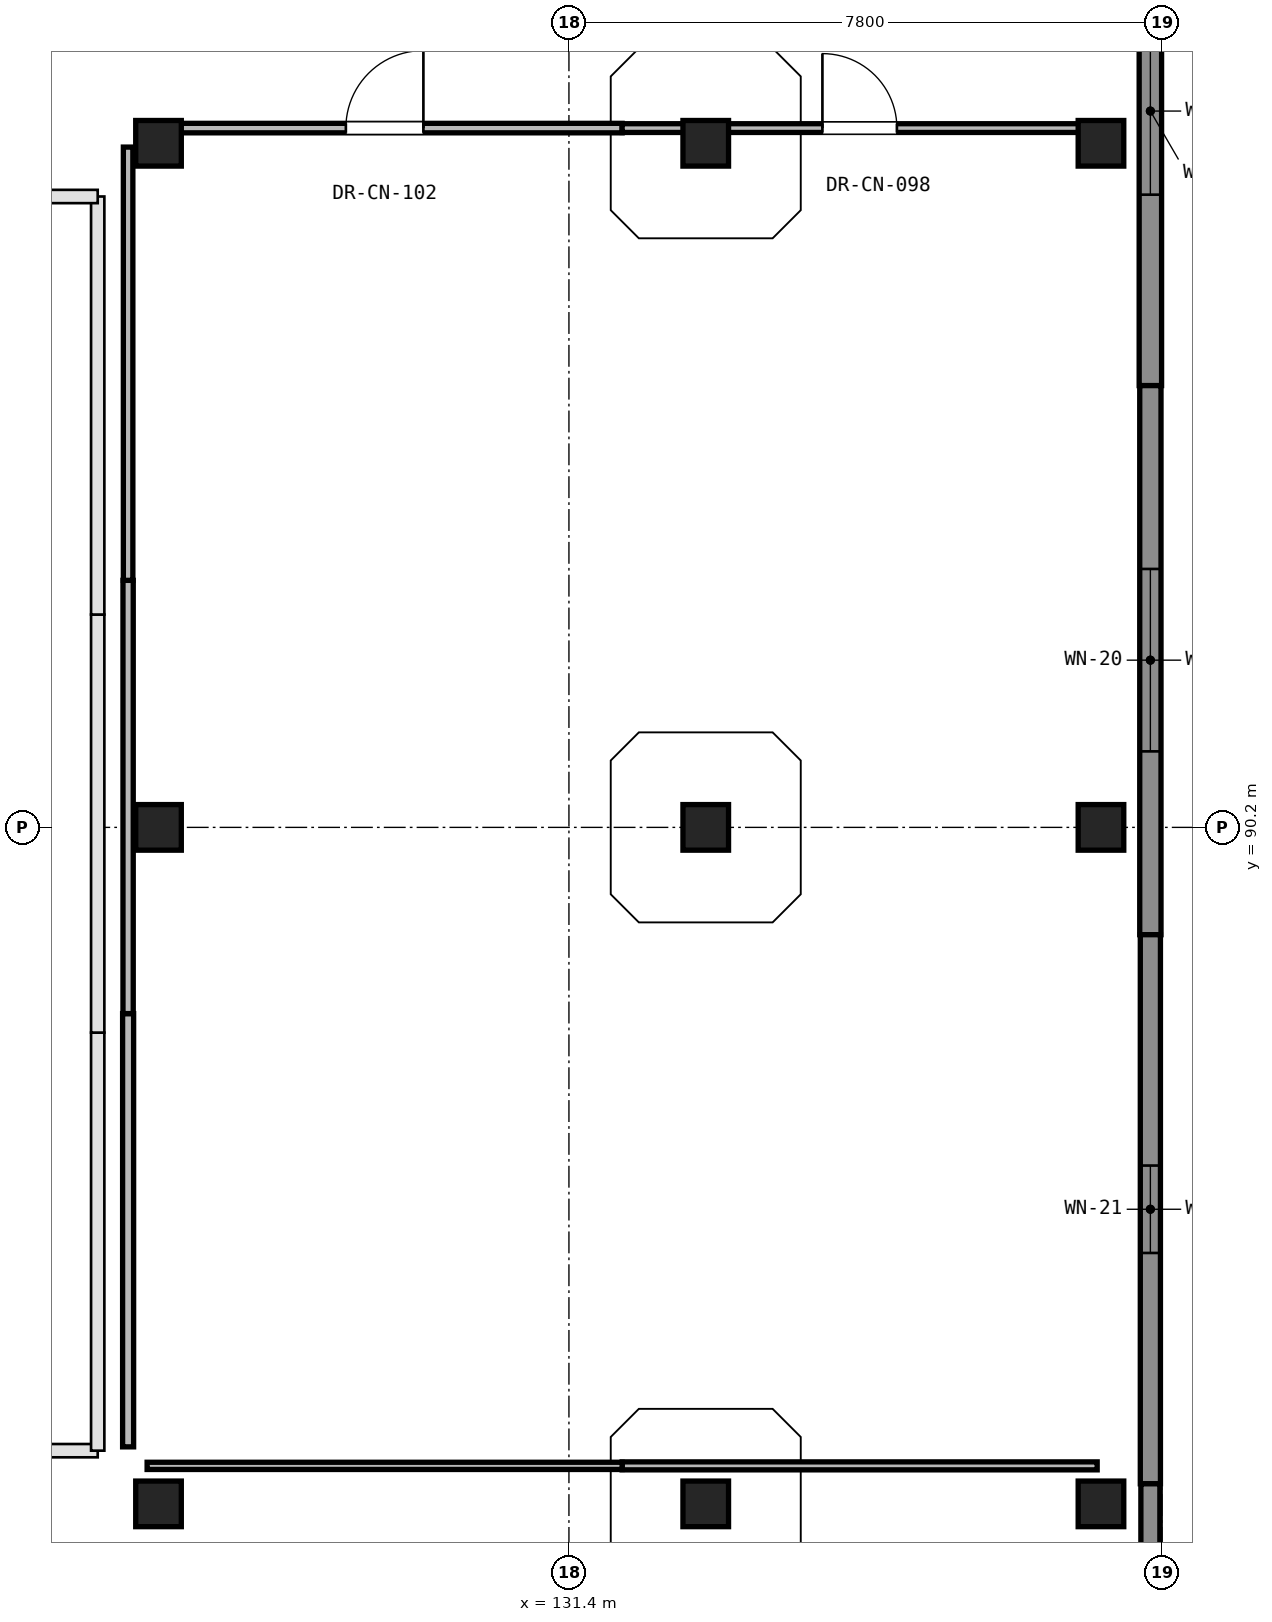
"""IFC4 building model, lengths in metres.
Left out: names, types, materials, properties, quantities, classifications, styles, units other than length and angle.
Written with IfcOpenShell. Run it as: python <this file> out.ifc"""

import sys

from ifc_helpers import new_model, si_unit, direction, frame, frame_2d, origin, origin_2d, place, context, subcontext, project, spatial, rectangle, extrude, element, fill, save


model = new_model("IFC4")
c1 = context("Model", 3, precision=1e-05, world=origin(), true_north=direction((0.0, 1.0)))
c2 = subcontext(c1, "Body", "Model", "MODEL_VIEW")
j1 = project(units=[si_unit("LENGTHUNIT", "METRE"), si_unit("PLANEANGLEUNIT", "RADIAN")], contexts=[c1])
p1 = place(None, origin())
s1 = spatial("IfcSite", under=j1, at=p1, CompositionType="ELEMENT")
p2 = place(p1, origin())
s2 = spatial("IfcBuilding", under=s1, at=p2, CompositionType="ELEMENT")
p3 = place(p2, frame((0.0, 0.0, 5.1)))
s3 = spatial("IfcBuildingStorey", under=s2, at=p3, CompositionType="ELEMENT", Elevation=5.1)
for number, where, z_axis, x_axis in (
    (1, (126.0, 81.3, 0.0), (0.0, 0.0, 1.0), (1.0, 0.0, 0.0)),
    (2, (126.0, 90.2, 0.0), (0.0, 0.0, 1.0), (1.0, 0.0, 0.0)),
    (3, (126.0, 99.2, 0.0), (0.0, 0.0, 1.0), (1.0, 0.0, 0.0)),
    (4, (133.2, 81.3, 0.0), (0.0, 0.0, 1.0), (1.0, 0.0, 0.0)),
    (5, (133.2, 90.2, 0.0), (0.0, 0.0, 1.0), (1.0, 0.0, 0.0)),
    (6, (133.2, 99.2, 0.0), (0.0, 0.0, 1.0), (1.0, 0.0, 0.0)),
    (7, (138.4, 81.3, 0.0), (0.0, 0.0, 1.0), (1.0, 0.0, 0.0)),
    (8, (138.4, 90.2, 0.0), (0.0, 0.0, 1.0), (1.0, 0.0, 0.0)),
    (9, (138.4, 99.2, 0.0), (0.0, 0.0, 1.0), (1.0, 0.0, 0.0)),
):
    element("IfcColumn", number, at=place(p3, frame(where, z_axis=z_axis, x_axis=x_axis)), inside=s3, PredefinedType="COLUMN", context=c2, shape_type="SweptSolid", body=[
        extrude(rectangle(XDim=0.6, YDim=0.6, at=origin_2d()), origin(), (0.0, 0.0, 1.0), 4.42),
    ])
p4 = place(p3, frame((139.05, 103.236, 0.0), z_axis=(0.0, 0.0, 1.0), x_axis=(0.0, -1.0, 0.0)))
e10 = element("IfcWall", 10, at=p4, inside=s3, PredefinedType="SOLIDWALL", context=c2, shape_type="SweptSolid", body=[
    extrude(rectangle(XDim=7.224, YDim=0.295, at=frame_2d((3.612, 0.0))), origin(), (0.0, 0.0, 1.0), 4.145),
])
p5 = place(p4, frame((2.512, 0.0, 0.9)))
e11 = element("IfcOpeningElement", 11, at=p5, cuts=e10, PredefinedType="OPENING", context=c2, shape_type="SweptSolid", body=[
    extrude(rectangle(XDim=2.2, YDim=1.75, at=frame_2d((1.1, 0.875))), frame((0.0, 0.157, 0.0), z_axis=(0.0, -1.0, 0.0), x_axis=(1.0, 0.0, 0.0)), (0.0, 0.0, 1.0), 0.315),
])
p6 = place(p3, frame((139.05, 96.012, 0.0), z_axis=(0.0, 0.0, 1.0), x_axis=(0.0, -1.0, 0.0)))
e12 = element("IfcWall", 12, at=p6, inside=s3, PredefinedType="SOLIDWALL", context=c2, shape_type="SweptSolid", body=[
    extrude(rectangle(XDim=7.224, YDim=0.28, at=frame_2d((3.612, 0.0))), origin(), (0.0, 0.0, 1.0), 4.145),
])
p7 = place(p6, frame((2.412, 0.0, 0.9)))
e13 = element("IfcOpeningElement", 13, at=p7, cuts=e12, PredefinedType="OPENING", context=c2, shape_type="SweptSolid", body=[
    extrude(rectangle(XDim=2.4, YDim=1.75, at=frame_2d((1.2, 0.875))), frame((0.0, 0.15, 0.0), z_axis=(0.0, -1.0, 0.0), x_axis=(1.0, 0.0, 0.0)), (0.0, 0.0, 1.0), 0.3),
])
p8 = place(p3, frame((139.05, 88.788, 0.0), z_axis=(0.0, 0.0, 1.0), x_axis=(0.0, -1.0, 0.0)))
e14 = element("IfcWall", 14, at=p8, inside=s3, PredefinedType="SOLIDWALL", context=c2, shape_type="SweptSolid", body=[
    extrude(rectangle(XDim=7.224, YDim=0.265, at=frame_2d((3.612, 0.0))), origin(), (0.0, 0.0, 1.0), 4.145),
])
p9 = place(p8, frame((3.037, 0.0, 0.9)))
e15 = element("IfcOpeningElement", 15, at=p9, cuts=e14, PredefinedType="OPENING", context=c2, shape_type="SweptSolid", body=[
    extrude(rectangle(XDim=1.15, YDim=2.0, at=frame_2d((0.575, 1.0))), frame((0.0, 0.142, 0.0), z_axis=(0.0, -1.0, 0.0), x_axis=(1.0, 0.0, 0.0)), (0.0, 0.0, 1.0), 0.285),
])
p10 = place(p3, frame((139.05, 81.564, 0.0), z_axis=(0.0, 0.0, 1.0), x_axis=(0.0, -1.0, 0.0)))
e16 = element("IfcWall", 16, at=p10, inside=s3, PredefinedType="SOLIDWALL", context=c2, shape_type="SweptSolid", body=[
    extrude(rectangle(XDim=7.224, YDim=0.25, at=frame_2d((3.612, 0.0))), origin(), (0.0, 0.0, 1.0), 4.145),
])
p11 = place(p10, frame((2.962, 0.0, 0.9)))
e17 = element("IfcOpeningElement", 17, at=p11, cuts=e16, PredefinedType="OPENING", context=c2, shape_type="SweptSolid", body=[
    extrude(rectangle(XDim=1.3, YDim=2.0, at=frame_2d((0.65, 1.0))), frame((0.0, 0.135, 0.0), z_axis=(0.0, -1.0, 0.0), x_axis=(1.0, 0.0, 0.0)), (0.0, 0.0, 1.0), 0.27),
])
p12 = place(p3, frame((125.85, 99.4, 0.0), z_axis=(0.0, 0.0, 1.0), x_axis=(1.0, 0.0, 0.0)))
e18 = element("IfcWall", 18, at=p12, inside=s3, PredefinedType="PARTITIONING", context=c2, shape_type="SweptSolid", body=[
    extrude(rectangle(XDim=6.25, YDim=0.125, at=frame_2d((3.125, 0.0))), origin(), (0.0, 0.0, 1.0), 3.395),
])
p13 = place(p12, frame((2.615, 0.0, 0.0)))
e19 = element("IfcOpeningElement", 19, at=p13, cuts=e18, PredefinedType="OPENING", context=c2, shape_type="SweptSolid", body=[
    extrude(rectangle(XDim=1.02, YDim=2.15, at=frame_2d((0.51, 1.075))), frame((0.0, 0.073, 0.0), z_axis=(0.0, -1.0, 0.0), x_axis=(1.0, 0.0, 0.0)), (0.0, 0.0, 1.0), 0.145),
])
p14 = place(p3, frame((132.1, 99.4, 0.0), z_axis=(0.0, 0.0, 1.0), x_axis=(1.0, 0.0, 0.0)))
e20 = element("IfcWall", 20, at=p14, inside=s3, PredefinedType="PARTITIONING", context=c2, shape_type="SweptSolid", body=[
    extrude(rectangle(XDim=6.25, YDim=0.115, at=frame_2d((3.125, 0.0))), origin(), (0.0, 0.0, 1.0), 3.345),
])
p15 = place(p14, frame((2.635, 0.0, 0.0)))
e21 = element("IfcOpeningElement", 21, at=p15, cuts=e20, PredefinedType="OPENING", context=c2, shape_type="SweptSolid", body=[
    extrude(rectangle(XDim=0.98, YDim=2.15, at=frame_2d((0.49, 1.075))), frame((0.0, 0.067, 0.0), z_axis=(0.0, -1.0, 0.0), x_axis=(1.0, 0.0, 0.0)), (0.0, 0.0, 1.0), 0.135),
])
p16 = place(p3, frame((138.35, 81.8, 0.0), z_axis=(0.0, 0.0, 1.0), x_axis=(-1.0, 0.0, 0.0)))
e22 = element("IfcWall", 22, at=p16, inside=s3, PredefinedType="PARTITIONING", context=c2, shape_type="SweptSolid", body=[
    extrude(rectangle(XDim=6.25, YDim=0.105, at=frame_2d((3.125, 0.0))), origin(), (0.0, 0.0, 1.0), 3.345),
])
p17 = place(p3, frame((132.1, 81.8, 0.0), z_axis=(0.0, 0.0, 1.0), x_axis=(-1.0, 0.0, 0.0)))
e23 = element("IfcWall", 23, at=p17, inside=s3, PredefinedType="PARTITIONING", context=c2, shape_type="SweptSolid", body=[
    extrude(rectangle(XDim=6.25, YDim=0.095, at=frame_2d((3.125, 0.0))), origin(), (0.0, 0.0, 1.0), 3.495),
])
p18 = place(p3, frame((125.6, 82.05, 0.0), z_axis=(0.0, 0.0, 1.0), x_axis=(0.0, 1.0, 0.0)))
e24 = element("IfcWall", 24, at=p18, inside=s3, PredefinedType="PARTITIONING", context=c2, shape_type="SweptSolid", body=[
    extrude(rectangle(XDim=5.7, YDim=0.145, at=frame_2d((2.85, 0.0))), origin(), (0.0, 0.0, 1.0), 4.145),
])
p19 = place(p3, frame((125.6, 87.75, 0.0), z_axis=(0.0, 0.0, 1.0), x_axis=(0.0, 1.0, 0.0)))
e25 = element("IfcWall", 25, at=p19, inside=s3, PredefinedType="PARTITIONING", context=c2, shape_type="SweptSolid", body=[
    extrude(rectangle(XDim=5.7, YDim=0.135, at=frame_2d((2.85, 0.0))), origin(), (0.0, 0.0, 1.0), 3.595),
])
p20 = place(p3, frame((125.6, 93.45, 0.0), z_axis=(0.0, 0.0, 1.0), x_axis=(0.0, 1.0, 0.0)))
e26 = element("IfcWall", 26, at=p20, inside=s3, PredefinedType="PARTITIONING", context=c2, shape_type="SweptSolid", body=[
    extrude(rectangle(XDim=5.7, YDim=0.125, at=frame_2d((2.85, 0.0))), origin(), (0.0, 0.0, 1.0), 3.445),
])
p21 = place(p5, origin())
e27 = element("IfcWindow", 27, at=p21, inside=s3, PartitioningType="SINGLE_PANEL", PredefinedType="WINDOW", context=c2, shape_type="SweptSolid", body=[
    extrude(rectangle(XDim=2.2, YDim=1.75, at=frame_2d((1.1, 0.875))), frame((0.0, 0.03, 0.0), z_axis=(0.0, -1.0, 0.0), x_axis=(1.0, 0.0, 0.0)), (0.0, 0.0, 1.0), 0.06),
])
fill(e11, e27)
p22 = place(p7, origin())
e28 = element("IfcWindow", 28, at=p22, inside=s3, PartitioningType="SINGLE_PANEL", PredefinedType="WINDOW", context=c2, shape_type="SweptSolid", body=[
    extrude(rectangle(XDim=2.4, YDim=1.75, at=frame_2d((1.2, 0.875))), frame((0.0, 0.03, 0.0), z_axis=(0.0, -1.0, 0.0), x_axis=(1.0, 0.0, 0.0)), (0.0, 0.0, 1.0), 0.06),
])
fill(e13, e28)
p23 = place(p9, origin())
e29 = element("IfcWindow", 29, at=p23, inside=s3, PartitioningType="SINGLE_PANEL", PredefinedType="WINDOW", context=c2, shape_type="SweptSolid", body=[
    extrude(rectangle(XDim=1.15, YDim=2.0, at=frame_2d((0.575, 1.0))), frame((0.0, 0.03, 0.0), z_axis=(0.0, -1.0, 0.0), x_axis=(1.0, 0.0, 0.0)), (0.0, 0.0, 1.0), 0.06),
])
fill(e15, e29)
p24 = place(p13, origin())
e30 = element("IfcDoor", 30, at=p24, inside=s3, OperationType="SINGLE_SWING_RIGHT", PredefinedType="DOOR", context=c2, shape_type="SweptSolid", body=[
    extrude(rectangle(XDim=1.02, YDim=2.15, at=frame_2d((0.51, 1.075))), frame((0.0, 0.025, 0.0), z_axis=(0.0, -1.0, 0.0), x_axis=(1.0, 0.0, 0.0)), (0.0, 0.0, 1.0), 0.05),
])
fill(e19, e30)
p25 = place(p15, origin())
e31 = element("IfcDoor", 31, at=p25, inside=s3, OperationType="SINGLE_SWING_LEFT", PredefinedType="DOOR", context=c2, shape_type="SweptSolid", body=[
    extrude(rectangle(XDim=0.98, YDim=2.15, at=frame_2d((0.49, 1.075))), frame((0.0, 0.025, 0.0), z_axis=(0.0, -1.0, 0.0), x_axis=(1.0, 0.0, 0.0)), (0.0, 0.0, 1.0), 0.05),
])
fill(e21, e31)
save(model, sys.argv[1])
